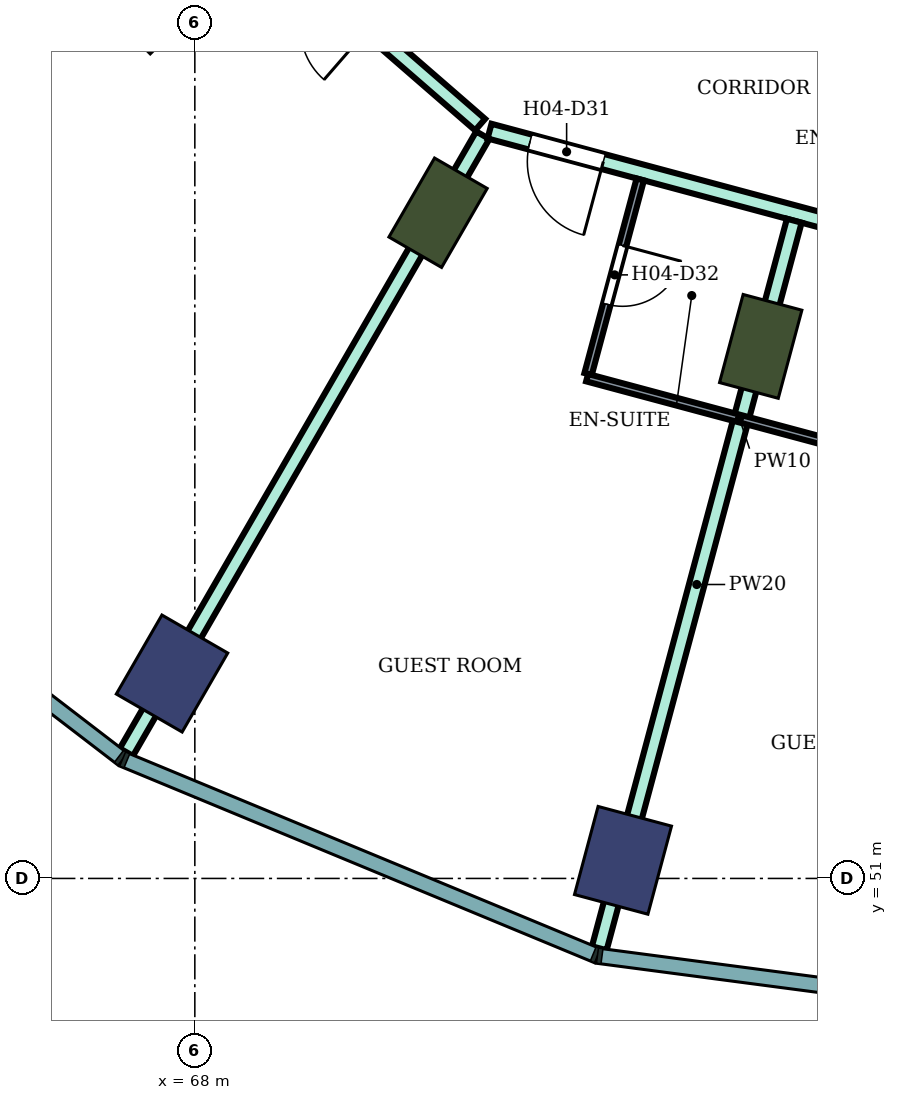
"""IFC4 building model, lengths in metres.
Left out: names, types, materials, properties, quantities, classifications, styles, units other than length and angle.
Written with IfcOpenShell. Run it as: python <this file> out.ifc"""

import sys

from ifc_helpers import new_model, si_unit, direction, frame, frame_2d, origin, origin_2d, place, context, subcontext, project, spatial, rectangle, extrude, element, fill, save


model = new_model("IFC4")
c1 = context("Model", 3, precision=1e-05, world=origin(), true_north=direction((0.0, 1.0)))
c2 = subcontext(c1, "Body", "Model", "MODEL_VIEW")
j1 = project(units=[si_unit("LENGTHUNIT", "METRE"), si_unit("PLANEANGLEUNIT", "RADIAN")], contexts=[c1])
p1 = place(None, origin())
s1 = spatial("IfcSite", under=j1, at=p1, CompositionType="ELEMENT")
p2 = place(p1, origin())
s2 = spatial("IfcBuilding", under=s1, at=p2, CompositionType="ELEMENT")
p3 = place(p2, frame((0.0, 0.0, 63.0)))
s3 = spatial("IfcBuildingStorey", under=s2, at=p3, CompositionType="ELEMENT", Elevation=63.0)
for number, where, z_axis, x_axis in (
    (1, (67.7, 53.696, 0.0), (0.0, 0.0, 1.0), (-0.5, -0.866, 0.0)),
    (2, (73.633, 51.238, 0.0), (0.0, 0.0, 1.0), (-0.259, -0.966, 0.0)),
):
    element("IfcColumn", number, at=place(p3, frame(where, z_axis=z_axis, x_axis=x_axis)), inside=s3, PredefinedType="COLUMN", context=c2, shape_type="SweptSolid", body=[
        extrude(rectangle(XDim=1.2, YDim=1.0, at=origin_2d()), origin(), (0.0, 0.0, 1.0), 3.8),
    ])
for number, where, z_axis, x_axis in (
    (3, (67.555, 62.555, 0.0), (0.0, 0.0, 1.0), (-0.707, -0.707, 0.0)),
    (4, (71.2, 59.758, 0.0), (0.0, 0.0, 1.0), (-0.5, -0.866, 0.0)),
    (5, (75.445, 58.0, 0.0), (0.0, 0.0, 1.0), (-0.259, -0.966, 0.0)),
):
    element("IfcColumn", number, at=place(p3, frame(where, z_axis=z_axis, x_axis=x_axis)), inside=s3, PredefinedType="COLUMN", context=c2, shape_type="SweptSolid", body=[
        extrude(rectangle(XDim=1.2, YDim=0.8, at=origin_2d()), origin(), (0.0, 0.0, 1.0), 3.8),
    ])
p4 = place(p3, frame((66.924, 65.111, 0.0), z_axis=(0.0, 0.0, 1.0), x_axis=(0.755023669255, -0.655697536113, 0.0)))
e6 = element("IfcWall", 6, at=p4, inside=s3, PredefinedType="PARTITIONING", context=c2, shape_type="SweptSolid", body=[
    extrude(rectangle(XDim=6.396, YDim=0.2, at=frame_2d((3.198, 0.0))), origin(), (0.0, 0.0, 1.0), 3.35),
])
p5 = place(p4, frame((2.658, 0.0, 0.0)))
e7 = element("IfcOpeningElement", 7, at=p5, cuts=e6, PredefinedType="OPENING", context=c2, shape_type="SweptSolid", body=[
    extrude(rectangle(XDim=1.8, YDim=2.1, at=frame_2d((0.9, 1.05))), frame((0.0, 0.11, 0.0), z_axis=(0.0, -1.0, 0.0), x_axis=(1.0, 0.0, 0.0)), (0.0, 0.0, 1.0), 0.22),
])
p6 = place(p3, frame((67.099, 52.661, 0.0), z_axis=(0.0, 0.0, 1.0), x_axis=(0.500234203776, 0.86589014394, 0.0)))
e8 = element("IfcWall", 8, at=p6, inside=s3, PredefinedType="PARTITIONING", context=c2, shape_type="SweptSolid", body=[
    extrude(rectangle(XDim=9.374, YDim=0.2, at=frame_2d((4.687, 0.0))), origin(), (0.0, 0.0, 1.0), 3.35),
])
p7 = place(p3, frame((71.877, 60.832, 0.0), z_axis=(0.0, 0.0, 1.0), x_axis=(0.965852509869, -0.259092510851, 0.0)))
e9 = element("IfcWall", 9, at=p7, inside=s3, PredefinedType="PARTITIONING", context=c2, shape_type="SweptSolid", body=[
    extrude(rectangle(XDim=8.32, YDim=0.2, at=frame_2d((4.16, 0.0))), origin(), (0.0, 0.0, 1.0), 3.35),
])
p8 = place(p7, frame((6.86, 0.0, 0.0)))
e10 = element("IfcOpeningElement", 10, at=p8, cuts=e9, PredefinedType="OPENING", context=c2, shape_type="SweptSolid", body=[
    extrude(rectangle(XDim=1.0, YDim=2.1, at=frame_2d((0.5, 1.05))), frame((0.0, 0.11, 0.0), z_axis=(0.0, -1.0, 0.0), x_axis=(1.0, 0.0, 0.0)), (0.0, 0.0, 1.0), 0.22),
])
p9 = place(p7, frame((0.55, 0.0, 0.0)))
e11 = element("IfcOpeningElement", 11, at=p9, cuts=e9, PredefinedType="OPENING", context=c2, shape_type="SweptSolid", body=[
    extrude(rectangle(XDim=1.0, YDim=2.1, at=frame_2d((0.5, 1.05))), frame((0.0, 0.11, 0.0), z_axis=(0.0, -1.0, 0.0), x_axis=(1.0, 0.0, 0.0)), (0.0, 0.0, 1.0), 0.22),
])
p10 = place(p3, frame((73.297, 63.143, 0.0), z_axis=(0.0, 0.0, 1.0), x_axis=(0.965859030528, -0.25906820173, 0.0)))
e12 = element("IfcWall", 12, at=p10, inside=s3, PredefinedType="PARTITIONING", context=c2, shape_type="SweptSolid", body=[
    extrude(rectangle(XDim=6.81, YDim=0.2, at=frame_2d((3.405, 0.0))), origin(), (0.0, 0.0, 1.0), 3.35),
])
p11 = place(p10, frame((5.39, 0.0, 0.0)))
e13 = element("IfcOpeningElement", 13, at=p11, cuts=e12, PredefinedType="OPENING", context=c2, shape_type="SweptSolid", body=[
    extrude(rectangle(XDim=1.0, YDim=2.1, at=frame_2d((0.5, 1.05))), frame((0.0, 0.11, 0.0), z_axis=(0.0, -1.0, 0.0), x_axis=(1.0, 0.0, 0.0)), (0.0, 0.0, 1.0), 0.22),
])
p12 = place(p3, frame((73.321, 50.081, 0.0), z_axis=(0.0, 0.0, 1.0), x_axis=(0.258889198551, 0.965907025999, 0.0)))
e14 = element("IfcWall", 14, at=p12, inside=s3, PredefinedType="PARTITIONING", context=c2, shape_type="SweptSolid", body=[
    extrude(rectangle(XDim=9.909, YDim=0.2, at=frame_2d((4.955, 0.0))), origin(), (0.0, 0.0, 1.0), 3.35),
])
p13 = place(p3, frame((73.174, 57.636, 0.0), z_axis=(0.0, 0.0, 1.0), x_axis=(0.258952498977, 0.96589005755, 0.0)))
e15 = element("IfcWall", 15, at=p13, inside=s3, PredefinedType="PARTITIONING", context=c2, shape_type="SweptSolid", body=[
    extrude(rectangle(XDim=2.65, YDim=0.1, at=frame_2d((1.325, 0.0))), origin(), (0.0, 0.0, 1.0), 3.35),
])
p14 = place(p13, frame((0.95, 0.0, 0.0)))
e16 = element("IfcOpeningElement", 16, at=p14, cuts=e15, PredefinedType="OPENING", context=c2, shape_type="SweptSolid", body=[
    extrude(rectangle(XDim=0.8, YDim=2.1, at=frame_2d((0.4, 1.05))), frame((0.0, 0.06, 0.0), z_axis=(0.0, -1.0, 0.0), x_axis=(1.0, 0.0, 0.0)), (0.0, 0.0, 1.0), 0.12),
])
p15 = place(p3, frame((73.161, 57.588, 0.0), z_axis=(0.0, 0.0, 1.0), x_axis=(0.965858994467, -0.259068336173, 0.0)))
e17 = element("IfcWall", 17, at=p15, inside=s3, PredefinedType="PARTITIONING", context=c2, shape_type="SweptSolid", body=[
    extrude(rectangle(XDim=4.15, YDim=0.1, at=frame_2d((2.075, 0.0))), origin(), (0.0, 0.0, 1.0), 3.35),
])
p16 = place(p9, frame((1.0, 0.0, 0.0), z_axis=(0.0, 0.0, 1.0), x_axis=(-1.0, 0.0, 0.0)))
e18 = element("IfcDoor", 18, at=p16, inside=s3, OperationType="SINGLE_SWING_LEFT", PredefinedType="DOOR", context=c2, shape_type="SweptSolid", body=[
    extrude(rectangle(XDim=1.0, YDim=2.1, at=frame_2d((0.5, 1.05))), frame((0.0, 0.025, 0.0), z_axis=(0.0, -1.0, 0.0), x_axis=(1.0, 0.0, 0.0)), (0.0, 0.0, 1.0), 0.05),
])
fill(e11, e18)
p17 = place(p14, frame((0.8, 0.0, 0.0), z_axis=(0.0, 0.0, 1.0), x_axis=(-1.0, 0.0, 0.0)))
e19 = element("IfcDoor", 19, at=p17, inside=s3, OperationType="SINGLE_SWING_LEFT", PredefinedType="DOOR", context=c2, shape_type="SweptSolid", body=[
    extrude(rectangle(XDim=0.8, YDim=2.1, at=frame_2d((0.4, 1.05))), frame((0.0, 0.025, 0.0), z_axis=(0.0, -1.0, 0.0), x_axis=(1.0, 0.0, 0.0)), (0.0, 0.0, 1.0), 0.05),
])
fill(e16, e19)
save(model, sys.argv[1])
